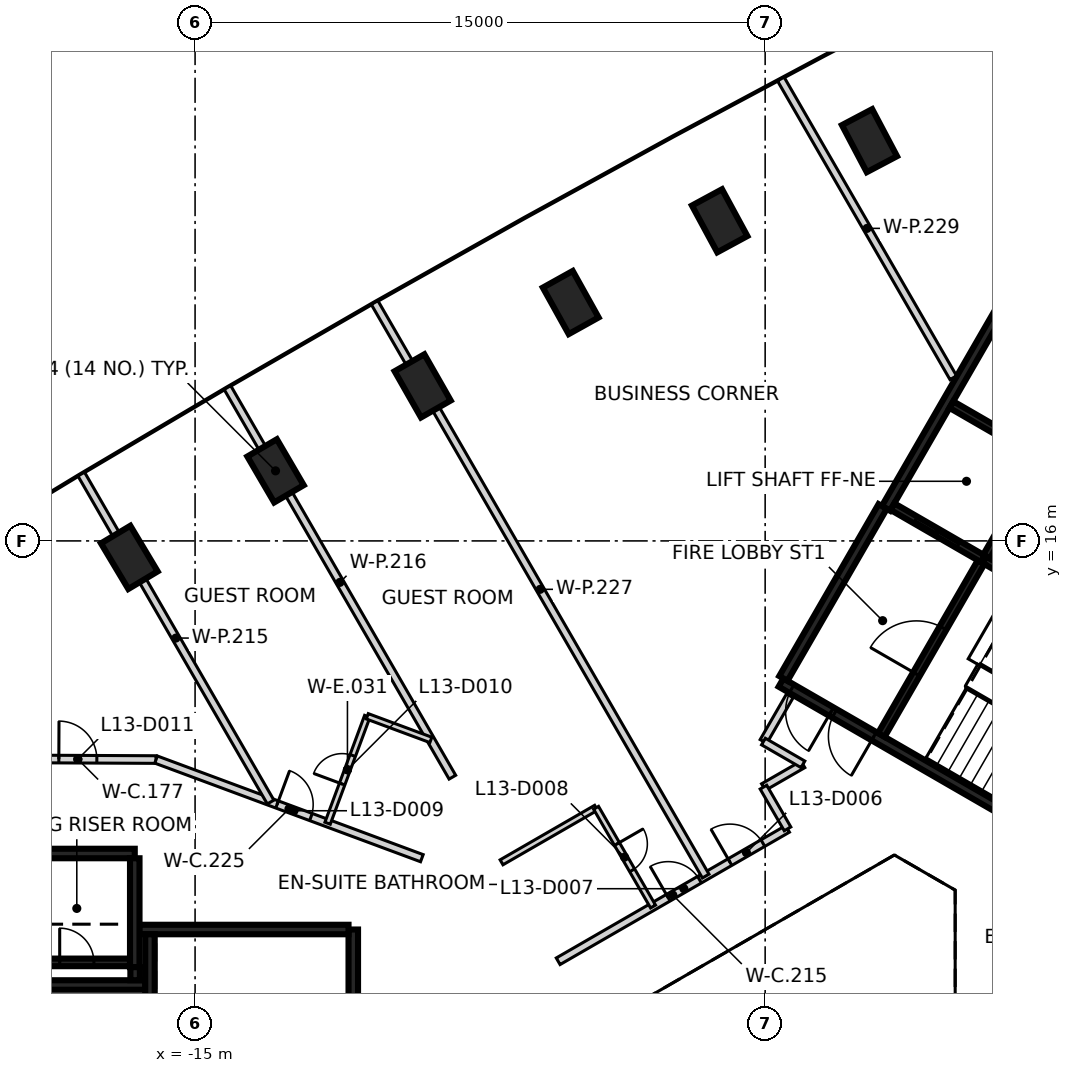
"""IFC4 building model, lengths in metres.
Left out: names, types, materials, properties, quantities, classifications, styles, units other than length and angle.
Written with IfcOpenShell. Run it as: python <this file> out.ifc"""

import sys

from ifc_helpers import new_model, si_unit, direction, frame, frame_2d, origin, origin_2d, place, context, subcontext, project, spatial, rectangle, extrude, element, fill, save


model = new_model("IFC4")
c1 = context("Model", 3, precision=1e-05, world=origin(), true_north=direction((0.0, 1.0)))
c2 = subcontext(c1, "Body", "Model", "MODEL_VIEW")
j1 = project(units=[si_unit("LENGTHUNIT", "METRE"), si_unit("PLANEANGLEUNIT", "RADIAN")], contexts=[c1])
p1 = place(None, origin())
s1 = spatial("IfcSite", under=j1, at=p1, CompositionType="ELEMENT")
p2 = place(p1, origin())
s2 = spatial("IfcBuilding", under=s1, at=p2, CompositionType="ELEMENT")
p3 = place(p2, frame((0.0, 0.0, 60.2)))
s3 = spatial("IfcBuildingStorey", under=s2, at=p3, CompositionType="ELEMENT", Elevation=60.2)
for number, where, z_axis, x_axis in (
    (1, (2.745, 26.531, -0.475), (0.0, 0.0, 1.0), (-0.467, 0.884, 0.0)),
    (2, (-1.197, 24.423, -0.475), (0.0, 0.0, 1.0), (-0.476, 0.879, 0.0)),
    (3, (-5.116, 22.272, -0.475), (0.0, 0.0, 1.0), (-0.486, 0.874, 0.0)),
    (4, (-9.011, 20.079, -0.475), (0.0, 0.0, 1.0), (-0.495, 0.869, 0.0)),
    (5, (-12.883, 17.844, -0.475), (0.0, 0.0, 1.0), (-0.505, 0.863, 0.0)),
    (6, (-16.73, 15.566, -0.475), (0.0, 0.0, 1.0), (-0.514, 0.858, 0.0)),
):
    element("IfcColumn", number, at=place(p3, frame(where, z_axis=z_axis, x_axis=x_axis)), inside=s3, PredefinedType="COLUMN", context=c2, shape_type="SweptSolid", body=[
        extrude(rectangle(XDim=1.4, YDim=0.9, at=origin_2d()), origin(), (0.0, 0.0, 1.0), 3.6),
    ])
p4 = place(p3, frame((-10.837, 5.775, 0.0), z_axis=(0.0, 0.0, 1.0), x_axis=(0.0, -1.0, 0.0)))
e7 = element("IfcWall", 7, at=p4, inside=s3, PredefinedType="SHEAR", context=c2, shape_type="SweptSolid", body=[
    extrude(rectangle(XDim=11.55, YDim=0.25, at=frame_2d((5.775, 0.0))), origin(), (0.0, 0.0, 1.0), 3.125),
])
p5 = place(p4, frame((10.025, 0.0, 0.0)))
e8 = element("IfcOpeningElement", 8, at=p5, cuts=e7, PredefinedType="OPENING", context=c2, shape_type="SweptSolid", body=[
    extrude(rectangle(XDim=1.2, YDim=2.1, at=frame_2d((0.6, 1.05))), frame((0.0, 0.135, 0.0), z_axis=(0.0, -1.0, 0.0), x_axis=(1.0, 0.0, 0.0)), (0.0, 0.0, 1.0), 0.27),
])
p6 = place(p4, frame((8.725, 0.0, 0.0)))
e9 = element("IfcOpeningElement", 9, at=p6, cuts=e7, PredefinedType="OPENING", context=c2, shape_type="SweptSolid", body=[
    extrude(rectangle(XDim=1.2, YDim=2.1, at=frame_2d((0.6, 1.05))), frame((0.0, 0.135, 0.0), z_axis=(0.0, -1.0, 0.0), x_axis=(1.0, 0.0, 0.0)), (0.0, 0.0, 1.0), 0.27),
])
p7 = place(p3, frame((-16.472, 5.775, 0.0), z_axis=(0.0, 0.0, 1.0), x_axis=(1.0, 0.0, 0.0)))
e10 = element("IfcWall", 10, at=p7, inside=s3, PredefinedType="SHEAR", context=c2, shape_type="SweptSolid", body=[
    extrude(rectangle(XDim=5.51, YDim=0.25, at=frame_2d((2.755, 0.0))), origin(), (0.0, 0.0, 1.0), 3.125),
])
p8 = place(p3, frame((-19.637, 7.775, 0.0), z_axis=(0.0, 0.0, 1.0), x_axis=(1.0, 0.0, 0.0)))
e11 = element("IfcWall", 11, at=p8, inside=s3, PredefinedType="SHEAR", context=c2, shape_type="SweptSolid", body=[
    extrude(rectangle(XDim=3.05, YDim=0.25, at=frame_2d((1.525, 0.0))), origin(), (0.0, 0.0, 1.0), 3.125),
])
p9 = place(p3, frame((-16.587, 7.65, 0.0), z_axis=(0.0, 0.0, 1.0), x_axis=(0.0, -1.0, 0.0)))
e12 = element("IfcWall", 12, at=p9, inside=s3, PredefinedType="SHEAR", context=c2, shape_type="SweptSolid", body=[
    extrude(rectangle(XDim=2.865, YDim=0.25, at=frame_2d((1.432, 0.0))), origin(), (0.0, 0.0, 1.0), 3.125),
])
p10 = place(p3, frame((-16.302, 4.315, 0.0), z_axis=(0.0, 0.0, 1.0), x_axis=(-1.0, 0.0, 0.0)))
e13 = element("IfcWall", 13, at=p10, inside=s3, PredefinedType="SHEAR", context=c2, shape_type="SweptSolid", body=[
    extrude(rectangle(XDim=3.085, YDim=0.25, at=frame_2d((1.542, 0.0))), origin(), (0.0, 0.0, 1.0), 3.125),
])
p11 = place(p3, frame((-16.187, 3.2, 0.0), z_axis=(0.0, 0.0, 1.0), x_axis=(0.0, 1.0, 0.0)))
e14 = element("IfcWall", 14, at=p11, inside=s3, PredefinedType="SHEAR", context=c2, shape_type="SweptSolid", body=[
    extrude(rectangle(XDim=2.449, YDim=0.25, at=frame_2d((1.225, 0.0))), origin(), (0.0, 0.0, 1.0), 3.125),
])
p12 = place(p3, frame((-16.577, 4.785, 0.0), z_axis=(0.0, 0.0, 1.0), x_axis=(0.0, -1.0, 0.0)))
e15 = element("IfcWall", 15, at=p12, inside=s3, PredefinedType="SHEAR", context=c2, shape_type="SweptSolid", body=[
    extrude(rectangle(XDim=0.344, YDim=0.25, at=frame_2d((0.172, 0.0))), origin(), (0.0, 0.0, 1.0), 3.125),
])
p13 = place(p3, frame((-19.511, 4.91, 0.0), z_axis=(0.0, 0.0, 1.0), x_axis=(1.0, 0.0, 0.0)))
e16 = element("IfcWall", 16, at=p13, inside=s3, PredefinedType="SHEAR", context=c2, shape_type="SweptSolid", body=[
    extrude(rectangle(XDim=2.798, YDim=0.2, at=frame_2d((1.399, 0.0))), origin(), (0.0, 0.0, 1.0), 3.125),
])
p14 = place(p13, frame((0.949, 0.0, 0.0)))
e17 = element("IfcOpeningElement", 17, at=p14, cuts=e16, PredefinedType="OPENING", context=c2, shape_type="SweptSolid", body=[
    extrude(rectangle(XDim=0.9, YDim=2.1, at=frame_2d((0.45, 1.05))), frame((0.0, 0.11, 0.0), z_axis=(0.0, -1.0, 0.0), x_axis=(1.0, 0.0, 0.0)), (0.0, 0.0, 1.0), 0.22),
])
p15 = place(p3, frame((10.42, 6.498, 0.0), z_axis=(0.0, 0.0, 1.0), x_axis=(-0.866021906294, 0.500006057782, 0.0)))
e18 = element("IfcWall", 18, at=p15, inside=s3, PredefinedType="SHEAR", context=c2, shape_type="SweptSolid", body=[
    extrude(rectangle(XDim=11.55, YDim=0.25, at=frame_2d((5.775, 0.0))), origin(), (0.0, 0.0, 1.0), 3.125),
])
p16 = place(p15, frame((10.025, 0.0, 0.0)))
e19 = element("IfcOpeningElement", 19, at=p16, cuts=e18, PredefinedType="OPENING", context=c2, shape_type="SweptSolid", body=[
    extrude(rectangle(XDim=1.2, YDim=2.1, at=frame_2d((0.6, 1.05))), frame((0.0, 0.135, 0.0), z_axis=(0.0, -1.0, 0.0), x_axis=(1.0, 0.0, 0.0)), (0.0, 0.0, 1.0), 0.27),
])
p17 = place(p15, frame((8.725, 0.0, 0.0)))
e20 = element("IfcOpeningElement", 20, at=p17, cuts=e18, PredefinedType="OPENING", context=c2, shape_type="SweptSolid", body=[
    extrude(rectangle(XDim=1.2, YDim=2.1, at=frame_2d((0.6, 1.05))), frame((0.0, 0.135, 0.0), z_axis=(0.0, -1.0, 0.0), x_axis=(1.0, 0.0, 0.0)), (0.0, 0.0, 1.0), 0.27),
])
p18 = place(p3, frame((3.179, 16.856, 0.0), z_axis=(0.0, 0.0, 1.0), x_axis=(0.500004234368, 0.866022959057, 0.0)))
e21 = element("IfcWall", 21, at=p18, inside=s3, PredefinedType="SHEAR", context=c2, shape_type="SweptSolid", body=[
    extrude(rectangle(XDim=6.25, YDim=0.25, at=frame_2d((3.125, 0.0))), origin(), (0.0, 0.0, 1.0), 3.125),
])
p19 = place(p3, frame((0.48, 12.381, 0.0), z_axis=(0.0, 0.0, 1.0), x_axis=(0.49999885962, 0.866026062182, 0.0)))
e22 = element("IfcWall", 22, at=p19, inside=s3, PredefinedType="SHEAR", context=c2, shape_type="SweptSolid", body=[
    extrude(rectangle(XDim=5.225, YDim=0.25, at=frame_2d((2.612, 0.0))), origin(), (0.0, 0.0, 1.0), 3.125),
])
p20 = place(p3, frame((5.775, 15.502, 0.0), z_axis=(0.0, 0.0, 1.0), x_axis=(0.866020080793, -0.500009219579, 0.0)))
e23 = element("IfcWall", 23, at=p20, inside=s3, PredefinedType="SHEAR", context=c2, shape_type="SweptSolid", body=[
    extrude(rectangle(XDim=5.699, YDim=0.2, at=frame_2d((2.85, 0.0))), origin(), (0.0, 0.0, 1.0), 3.125),
])
p21 = place(p3, frame((3.057, 10.895, 0.0), z_axis=(0.0, 0.0, 1.0), x_axis=(0.499989418164, 0.866031513124, 0.0)))
e24 = element("IfcWall", 24, at=p21, inside=s3, PredefinedType="SHEAR", context=c2, shape_type="SweptSolid", body=[
    extrude(rectangle(XDim=5.251, YDim=0.2, at=frame_2d((2.625, 0.0))), origin(), (0.0, 0.0, 1.0), 3.125),
])
p22 = place(p21, frame((1.849, 0.0, 0.0)))
e25 = element("IfcOpeningElement", 25, at=p22, cuts=e24, PredefinedType="OPENING", context=c2, shape_type="SweptSolid", body=[
    extrude(rectangle(XDim=1.4, YDim=2.1, at=frame_2d((0.7, 1.05))), frame((0.0, 0.11, 0.0), z_axis=(0.0, -1.0, 0.0), x_axis=(1.0, 0.0, 0.0)), (0.0, 0.0, 1.0), 0.22),
])
p23 = place(p3, frame((7.199, 17.97, 0.0), z_axis=(0.0, 0.0, 1.0), x_axis=(-0.499968400327, -0.866043647095, 0.0)))
e26 = element("IfcWall", 26, at=p23, inside=s3, PredefinedType="SHEAR", context=c2, shape_type="SweptSolid", body=[
    extrude(rectangle(XDim=2.75, YDim=0.2, at=frame_2d((1.375, 0.0))), origin(), (0.0, 0.0, 1.0), 3.125),
])
p24 = place(p3, frame((5.725, 15.531, 0.0), z_axis=(0.0, 0.0, 1.0), x_axis=(-0.866037306777, 0.499979382845, 0.0)))
e27 = element("IfcWall", 27, at=p24, inside=s3, PredefinedType="SHEAR", context=c2, shape_type="SweptSolid", body=[
    extrude(rectangle(XDim=2.742, YDim=0.2, at=frame_2d((1.371, 0.0))), origin(), (0.0, 0.0, 1.0), 3.125),
])
p25 = place(p24, frame((0.743, 0.0, 0.0)))
e28 = element("IfcOpeningElement", 28, at=p25, cuts=e27, PredefinedType="OPENING", context=c2, shape_type="SweptSolid", body=[
    extrude(rectangle(XDim=1.3, YDim=2.1, at=frame_2d((0.65, 1.05))), frame((0.0, 0.11, 0.0), z_axis=(0.0, -1.0, 0.0), x_axis=(1.0, 0.0, 0.0)), (0.0, 0.0, 1.0), 0.22),
])
p26 = place(p3, frame((4.901, 19.586, 0.0), z_axis=(0.0, 0.0, 1.0), x_axis=(0.866022890907, -0.500004352405, 0.0)))
e29 = element("IfcWall", 29, at=p26, inside=s3, PredefinedType="SHEAR", context=c2, shape_type="SweptSolid", body=[
    extrude(rectangle(XDim=2.799, YDim=0.2, at=frame_2d((1.399, 0.0))), origin(), (0.0, 0.0, 1.0), 3.125),
])
p27 = place(p3, frame((-20.143, 10.266, 0.0), z_axis=(0.0, 0.0, 1.0), x_axis=(0.999989297417, -0.004626559416, 0.0)))
e30 = element("IfcWall", 30, at=p27, inside=s3, PredefinedType="PARTITIONING", context=c2, shape_type="SweptSolid", body=[
    extrude(rectangle(XDim=4.116, YDim=0.2, at=frame_2d((2.058, 0.0))), origin(), (0.0, 0.0, 1.0), 3.125),
])
p28 = place(p27, frame((1.558, 0.0, 0.0)))
e31 = element("IfcOpeningElement", 31, at=p28, cuts=e30, PredefinedType="OPENING", context=c2, shape_type="SweptSolid", body=[
    extrude(rectangle(XDim=1.0, YDim=2.1, at=frame_2d((0.5, 1.05))), frame((0.0, 0.11, 0.0), z_axis=(0.0, -1.0, 0.0), x_axis=(1.0, 0.0, 0.0)), (0.0, 0.0, 1.0), 0.22),
])
p29 = place(p3, frame((-16.026, 10.247, 0.0), z_axis=(0.0, 0.0, 1.0), x_axis=(0.937540909117, -0.347875040397, 0.0)))
e32 = element("IfcWall", 32, at=p29, inside=s3, PredefinedType="PARTITIONING", context=c2, shape_type="SweptSolid", body=[
    extrude(rectangle(XDim=7.459, YDim=0.2, at=frame_2d((3.729, 0.0))), origin(), (0.0, 0.0, 1.0), 3.125),
])
p30 = place(p29, frame((3.396, 0.0, 0.0)))
e33 = element("IfcOpeningElement", 33, at=p30, cuts=e32, PredefinedType="OPENING", context=c2, shape_type="SweptSolid", body=[
    extrude(rectangle(XDim=0.95, YDim=2.1, at=frame_2d((0.475, 1.05))), frame((0.0, 0.11, 0.0), z_axis=(0.0, -1.0, 0.0), x_axis=(1.0, 0.0, 0.0)), (0.0, 0.0, 1.0), 0.22),
])
p31 = place(p3, frame((-5.446, 4.94, 0.0), z_axis=(0.0, 0.0, 1.0), x_axis=(0.866096332545, 0.499877127655, 0.0)))
e34 = element("IfcWall", 34, at=p31, inside=s3, PredefinedType="PARTITIONING", context=c2, shape_type="SweptSolid", body=[
    extrude(rectangle(XDim=6.969, YDim=0.2, at=frame_2d((3.484, 0.0))), origin(), (0.0, 0.0, 1.0), 3.125),
])
p32 = place(p31, frame((5.219, 0.0, 0.0)))
e35 = element("IfcOpeningElement", 35, at=p32, cuts=e34, PredefinedType="OPENING", context=c2, shape_type="SweptSolid", body=[
    extrude(rectangle(XDim=1.0, YDim=2.1, at=frame_2d((0.5, 1.05))), frame((0.0, 0.11, 0.0), z_axis=(0.0, -1.0, 0.0), x_axis=(1.0, 0.0, 0.0)), (0.0, 0.0, 1.0), 0.22),
])
p33 = place(p31, frame((3.344, 0.0, 0.0)))
e36 = element("IfcOpeningElement", 36, at=p33, cuts=e34, PredefinedType="OPENING", context=c2, shape_type="SweptSolid", body=[
    extrude(rectangle(XDim=0.95, YDim=2.1, at=frame_2d((0.475, 1.05))), frame((0.0, 0.11, 0.0), z_axis=(0.0, -1.0, 0.0), x_axis=(1.0, 0.0, 0.0)), (0.0, 0.0, 1.0), 0.22),
])
p34 = place(p3, frame((-0.045, 9.522, 0.0), z_axis=(0.0, 0.0, 1.0), x_axis=(0.86625675314, 0.499599076899, 0.0)))
e37 = element("IfcWall", 37, at=p34, inside=s3, PredefinedType="PARTITIONING", context=c2, shape_type="SweptSolid", body=[
    extrude(rectangle(XDim=1.199, YDim=0.2, at=frame_2d((0.6, 0.0))), origin(), (0.0, 0.0, 1.0), 3.125),
])
p35 = place(p3, frame((-0.045, 10.722, 0.0), z_axis=(0.0, 0.0, 1.0), x_axis=(0.500107785535, 0.865963164833, 0.0)))
e38 = element("IfcWall", 38, at=p35, inside=s3, PredefinedType="PARTITIONING", context=c2, shape_type="SweptSolid", body=[
    extrude(rectangle(XDim=1.389, YDim=0.2, at=frame_2d((0.695, 0.0))), origin(), (0.0, 0.0, 1.0), 3.125),
])
p36 = place(p3, frame((-0.045, 9.521, 0.0), z_axis=(0.0, 0.0, 1.0), x_axis=(0.500094716449, -0.865970712311, 0.0)))
e39 = element("IfcWall", 39, at=p36, inside=s3, PredefinedType="PARTITIONING", context=c2, shape_type="SweptSolid", body=[
    extrude(rectangle(XDim=1.268, YDim=0.2, at=frame_2d((0.634, 0.0))), origin(), (0.0, 0.0, 1.0), 3.125),
])
p37 = place(p3, frame((-0.045, 10.721, 0.0), z_axis=(0.0, 0.0, 1.0), x_axis=(0.865992388649, -0.500057179532, 0.0)))
e40 = element("IfcWall", 40, at=p37, inside=s3, PredefinedType="PARTITIONING", context=c2, shape_type="SweptSolid", body=[
    extrude(rectangle(XDim=1.199, YDim=0.2, at=frame_2d((0.6, 0.0))), origin(), (0.0, 0.0, 1.0), 3.125),
])
p38 = place(p3, frame((-17.996, 17.758, 0.0), z_axis=(0.0, 0.0, 1.0), x_axis=(0.500046945013, -0.865998298372, 0.0)))
e41 = element("IfcWall", 41, at=p38, inside=s3, PredefinedType="PARTITIONING", context=c2, shape_type="SweptSolid", body=[
    extrude(rectangle(XDim=9.964, YDim=0.2, at=frame_2d((4.982, 0.0))), origin(), (0.0, 0.0, 1.0), 3.125),
])
p39 = place(p3, frame((-14.149, 20.035, 0.0), z_axis=(0.0, 0.0, 1.0), x_axis=(0.500022967158, -0.866012143284, 0.0)))
e42 = element("IfcWall", 42, at=p39, inside=s3, PredefinedType="PARTITIONING", context=c2, shape_type="SweptSolid", body=[
    extrude(rectangle(XDim=11.838, YDim=0.2, at=frame_2d((5.919, 0.0))), origin(), (0.0, 0.0, 1.0), 3.125),
])
p40 = place(p3, frame((-10.276, 22.271, 0.0), z_axis=(0.0, 0.0, 1.0), x_axis=(0.499975954304, -0.866039286129, 0.0)))
e43 = element("IfcWall", 43, at=p40, inside=s3, PredefinedType="PARTITIONING", context=c2, shape_type="SweptSolid", body=[
    extrude(rectangle(XDim=17.424, YDim=0.2, at=frame_2d((8.712, 0.0))), origin(), (0.0, 0.0, 1.0), 3.125),
])
p41 = place(p3, frame((0.412, 28.153, 0.0), z_axis=(0.0, 0.0, 1.0), x_axis=(0.500039143415, -0.866002803143, 0.0)))
e44 = element("IfcWall", 44, at=p41, inside=s3, PredefinedType="PARTITIONING", context=c2, shape_type="SweptSolid", body=[
    extrude(rectangle(XDim=9.075, YDim=0.2, at=frame_2d((4.538, 0.0))), origin(), (0.0, 0.0, 1.0), 2.225),
])
p42 = place(p3, frame((-11.513, 8.572, 0.0), z_axis=(0.0, 0.0, 1.0), x_axis=(0.347929104424, 0.937520846859, 0.0)))
e45 = element("IfcWall", 45, at=p42, inside=s3, PredefinedType="PARTITIONING", context=c2, shape_type="SweptSolid", body=[
    extrude(rectangle(XDim=3.0, YDim=0.15, at=frame_2d((1.5, 0.0))), origin(), (0.0, 0.0, 1.0), 3.125),
])
p43 = place(p42, frame((1.1, 0.0, 0.0)))
e46 = element("IfcOpeningElement", 46, at=p43, cuts=e45, PredefinedType="OPENING", context=c2, shape_type="SweptSolid", body=[
    extrude(rectangle(XDim=0.8, YDim=2.1, at=frame_2d((0.4, 1.05))), frame((0.0, 0.085, 0.0), z_axis=(0.0, -1.0, 0.0), x_axis=(1.0, 0.0, 0.0)), (0.0, 0.0, 1.0), 0.17),
])
p44 = place(p3, frame((-10.469, 11.385, 0.0), z_axis=(0.0, 0.0, 1.0), x_axis=(0.937487768635, -0.348018223173, 0.0)))
e47 = element("IfcWall", 47, at=p44, inside=s3, PredefinedType="PARTITIONING", context=c2, shape_type="SweptSolid", body=[
    extrude(rectangle(XDim=1.785, YDim=0.15, at=frame_2d((0.892, 0.0))), origin(), (0.0, 0.0, 1.0), 3.125),
])
p45 = place(p3, frame((-6.936, 7.543, 0.0), z_axis=(0.0, 0.0, 1.0), x_axis=(0.866153027342, 0.499778884334, 0.0)))
e48 = element("IfcWall", 48, at=p45, inside=s3, PredefinedType="PARTITIONING", context=c2, shape_type="SweptSolid", body=[
    extrude(rectangle(XDim=2.871, YDim=0.15, at=frame_2d((1.436, 0.0))), origin(), (0.0, 0.0, 1.0), 3.125),
])
p46 = place(p3, frame((-4.449, 8.978, 0.0), z_axis=(0.0, 0.0, 1.0), x_axis=(0.499745940409, -0.866172035478, 0.0)))
e49 = element("IfcWall", 49, at=p46, inside=s3, PredefinedType="PARTITIONING", context=c2, shape_type="SweptSolid", body=[
    extrude(rectangle(XDim=3.0, YDim=0.15, at=frame_2d((1.5, 0.0))), origin(), (0.0, 0.0, 1.0), 3.125),
])
p47 = place(p46, frame((1.1, 0.0, 0.0)))
e50 = element("IfcOpeningElement", 50, at=p47, cuts=e49, PredefinedType="OPENING", context=c2, shape_type="SweptSolid", body=[
    extrude(rectangle(XDim=0.8, YDim=2.1, at=frame_2d((0.4, 1.05))), frame((0.0, 0.085, 0.0), z_axis=(0.0, -1.0, 0.0), x_axis=(1.0, 0.0, 0.0)), (0.0, 0.0, 1.0), 0.17),
])
p48 = place(p14, origin())
e51 = element("IfcDoor", 51, at=p48, inside=s3, OperationType="SINGLE_SWING_RIGHT", PredefinedType="DOOR", context=c2, shape_type="SweptSolid", body=[
    extrude(rectangle(XDim=0.9, YDim=2.1, at=frame_2d((0.45, 1.05))), frame((0.0, 0.025, 0.0), z_axis=(0.0, -1.0, 0.0), x_axis=(1.0, 0.0, 0.0)), (0.0, 0.0, 1.0), 0.05),
])
fill(e17, e51)
p49 = place(p25, origin())
e52 = element("IfcDoor", 52, at=p49, inside=s3, OperationType="SLIDING_TO_LEFT", PredefinedType="DOOR", context=c2, shape_type="SweptSolid", body=[
    extrude(rectangle(XDim=1.3, YDim=2.1, at=frame_2d((0.65, 1.05))), frame((0.0, 0.025, 0.0), z_axis=(0.0, -1.0, 0.0), x_axis=(1.0, 0.0, 0.0)), (0.0, 0.0, 1.0), 0.05),
])
fill(e28, e52)
p50 = place(p16, origin())
e53 = element("IfcDoor", 53, at=p50, inside=s3, OperationType="SINGLE_SWING_LEFT", PredefinedType="DOOR", context=c2, shape_type="SweptSolid", body=[
    extrude(rectangle(XDim=1.2, YDim=2.1, at=frame_2d((0.6, 1.05))), frame((0.0, 0.025, 0.0), z_axis=(0.0, -1.0, 0.0), x_axis=(1.0, 0.0, 0.0)), (0.0, 0.0, 1.0), 0.05),
])
fill(e19, e53)
p51 = place(p17, origin())
e54 = element("IfcDoor", 54, at=p51, inside=s3, OperationType="SINGLE_SWING_RIGHT", PredefinedType="DOOR", context=c2, shape_type="SweptSolid", body=[
    extrude(rectangle(XDim=1.2, YDim=2.1, at=frame_2d((0.6, 1.05))), frame((0.0, 0.025, 0.0), z_axis=(0.0, -1.0, 0.0), x_axis=(1.0, 0.0, 0.0)), (0.0, 0.0, 1.0), 0.05),
])
fill(e20, e54)
p52 = place(p22, origin())
e55 = element("IfcDoor", 55, at=p52, inside=s3, OperationType="SINGLE_SWING_LEFT", PredefinedType="DOOR", context=c2, shape_type="SweptSolid", body=[
    extrude(rectangle(XDim=1.4, YDim=2.1, at=frame_2d((0.7, 1.05))), frame((0.0, 0.025, 0.0), z_axis=(0.0, -1.0, 0.0), x_axis=(1.0, 0.0, 0.0)), (0.0, 0.0, 1.0), 0.05),
])
fill(e25, e55)
p53 = place(p32, origin())
e56 = element("IfcDoor", 56, at=p53, inside=s3, OperationType="SINGLE_SWING_LEFT", PredefinedType="DOOR", context=c2, shape_type="SweptSolid", body=[
    extrude(rectangle(XDim=1.0, YDim=2.1, at=frame_2d((0.5, 1.05))), frame((0.0, 0.025, 0.0), z_axis=(0.0, -1.0, 0.0), x_axis=(1.0, 0.0, 0.0)), (0.0, 0.0, 1.0), 0.05),
])
fill(e35, e56)
p54 = place(p33, origin())
e57 = element("IfcDoor", 57, at=p54, inside=s3, OperationType="SINGLE_SWING_LEFT", PredefinedType="DOOR", context=c2, shape_type="SweptSolid", body=[
    extrude(rectangle(XDim=0.95, YDim=2.1, at=frame_2d((0.475, 1.05))), frame((0.0, 0.025, 0.0), z_axis=(0.0, -1.0, 0.0), x_axis=(1.0, 0.0, 0.0)), (0.0, 0.0, 1.0), 0.05),
])
fill(e36, e57)
p55 = place(p47, frame((0.8, 0.0, 0.0), z_axis=(0.0, 0.0, 1.0), x_axis=(-1.0, 0.0, 0.0)))
e58 = element("IfcDoor", 58, at=p55, inside=s3, OperationType="SINGLE_SWING_LEFT", PredefinedType="DOOR", context=c2, shape_type="SweptSolid", body=[
    extrude(rectangle(XDim=0.8, YDim=2.1, at=frame_2d((0.4, 1.05))), frame((0.0, 0.025, 0.0), z_axis=(0.0, -1.0, 0.0), x_axis=(1.0, 0.0, 0.0)), (0.0, 0.0, 1.0), 0.05),
])
fill(e50, e58)
p56 = place(p30, origin())
e59 = element("IfcDoor", 59, at=p56, inside=s3, OperationType="SINGLE_SWING_LEFT", PredefinedType="DOOR", context=c2, shape_type="SweptSolid", body=[
    extrude(rectangle(XDim=0.95, YDim=2.1, at=frame_2d((0.475, 1.05))), frame((0.0, 0.025, 0.0), z_axis=(0.0, -1.0, 0.0), x_axis=(1.0, 0.0, 0.0)), (0.0, 0.0, 1.0), 0.05),
])
fill(e33, e59)
p57 = place(p43, origin())
e60 = element("IfcDoor", 60, at=p57, inside=s3, OperationType="SINGLE_SWING_LEFT", PredefinedType="DOOR", context=c2, shape_type="SweptSolid", body=[
    extrude(rectangle(XDim=0.8, YDim=2.1, at=frame_2d((0.4, 1.05))), frame((0.0, 0.025, 0.0), z_axis=(0.0, -1.0, 0.0), x_axis=(1.0, 0.0, 0.0)), (0.0, 0.0, 1.0), 0.05),
])
fill(e46, e60)
p58 = place(p28, origin())
e61 = element("IfcDoor", 61, at=p58, inside=s3, OperationType="SINGLE_SWING_LEFT", PredefinedType="DOOR", context=c2, shape_type="SweptSolid", body=[
    extrude(rectangle(XDim=1.0, YDim=2.1, at=frame_2d((0.5, 1.05))), frame((0.0, 0.025, 0.0), z_axis=(0.0, -1.0, 0.0), x_axis=(1.0, 0.0, 0.0)), (0.0, 0.0, 1.0), 0.05),
])
fill(e31, e61)
save(model, sys.argv[1])
